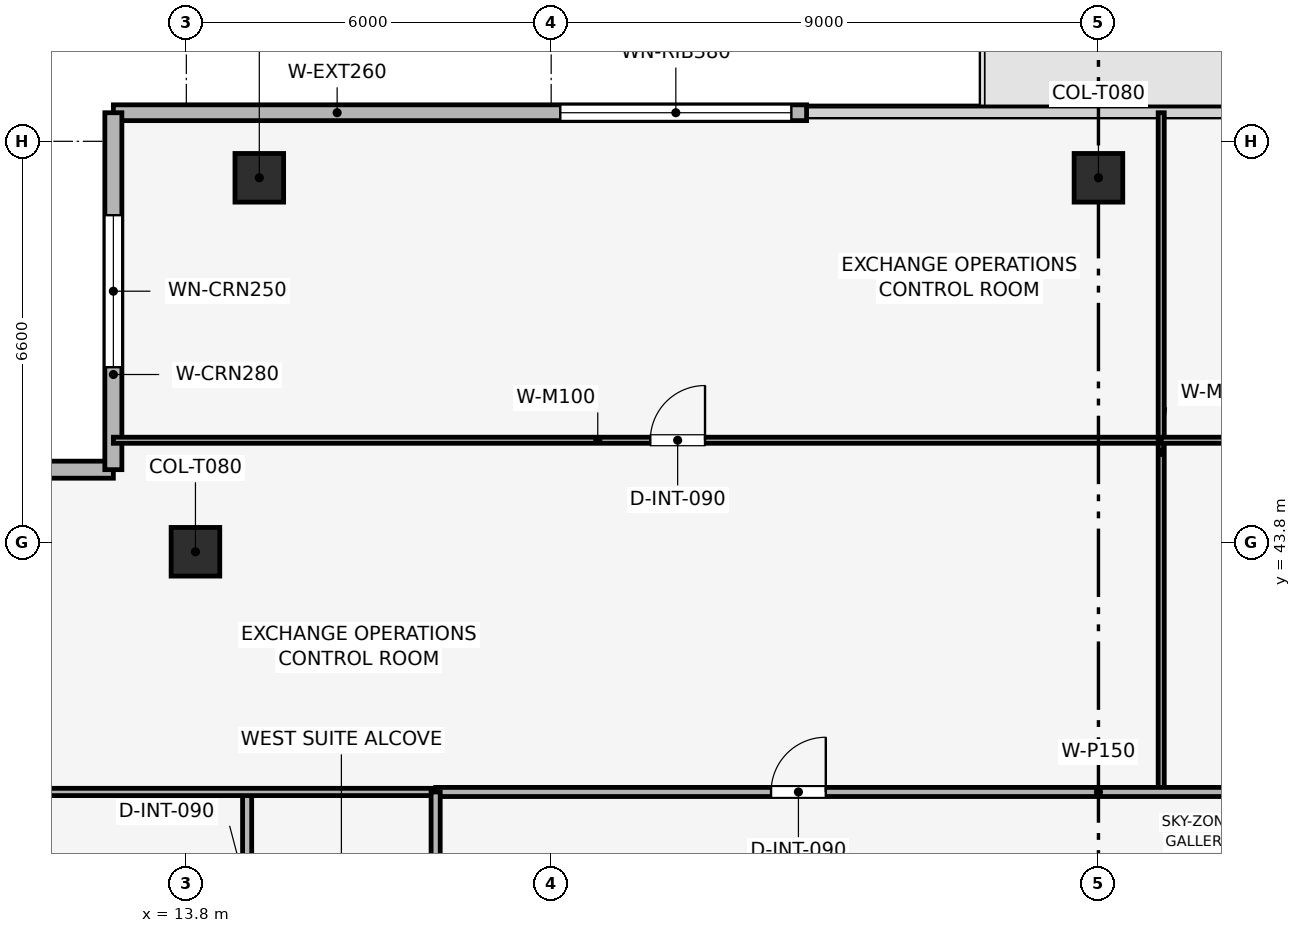
"""IFC4 building model, lengths in metres.
Left out: names, types, materials, properties, quantities, classifications, styles, units other than length and angle.
Written with IfcOpenShell. Run it as: python <this file> out.ifc"""

import sys

from ifc_helpers import new_model, si_unit, direction, frame, frame_2d, origin, origin_2d, place, context, subcontext, project, spatial, rectangle, extrude, element, fill, save


model = new_model("IFC4")
c1 = context("Model", 3, precision=1e-05, world=origin(), true_north=direction((0.0, 1.0)))
c2 = subcontext(c1, "Body", "Model", "MODEL_VIEW")
j1 = project(units=[si_unit("LENGTHUNIT", "METRE"), si_unit("PLANEANGLEUNIT", "RADIAN")], contexts=[c1])
p1 = place(None, origin())
s1 = spatial("IfcSite", under=j1, at=p1, CompositionType="ELEMENT")
p2 = place(p1, origin())
s2 = spatial("IfcBuilding", under=s1, at=p2, CompositionType="ELEMENT")
p3 = place(p2, frame((0.0, 0.0, 336.75)))
s3 = spatial("IfcBuildingStorey", under=s2, at=p3, CompositionType="ELEMENT", Elevation=336.75)
for number, where, z_axis, x_axis in (
    (1, (28.8, 49.8, 0.003), (0.0, 0.0, 1.0), (1.0, 0.0, 0.0)),
    (2, (15.0, 49.8, 0.003), (0.0, 0.0, 1.0), (1.0, 0.0, 0.0)),
    (3, (13.95, 43.65, 0.003), (0.0, 0.0, 1.0), (1.0, 0.0, 0.0)),
):
    element("IfcColumn", number, at=place(p3, frame(where, z_axis=z_axis, x_axis=x_axis)), inside=s3, PredefinedType="COLUMN", context=c2, shape_type="SweptSolid", body=[
        extrude(rectangle(XDim=0.8, YDim=0.8, at=origin_2d()), origin(), (0.0, 0.0, 1.0), 3.504),
    ])
p4 = place(p3, frame((12.6, 50.87, 0.0), z_axis=(0.0, 0.0, 1.0), x_axis=(1.0, 0.0, 0.0)))
e4 = element("IfcWall", 4, at=p4, inside=s3, PredefinedType="SOLIDWALL", context=c2, shape_type="SweptSolid", body=[
    extrude(rectangle(XDim=11.4, YDim=0.26, at=frame_2d((5.7, 0.0))), origin(), (0.0, 0.0, 1.0), 3.51),
])
p5 = place(p4, frame((7.35, 0.0, 0.9)))
e5 = element("IfcOpeningElement", 5, at=p5, cuts=e4, PredefinedType="OPENING", context=c2, shape_type="SweptSolid", body=[
    extrude(rectangle(XDim=3.8, YDim=1.9, at=frame_2d((1.9, 0.95))), frame((0.0, 0.14, 0.0), z_axis=(0.0, -1.0, 0.0), x_axis=(1.0, 0.0, 0.0)), (0.0, 0.0, 1.0), 0.28),
])
p6 = place(p3, frame((6.73, 45.0, 0.0), z_axis=(0.0, 0.0, 1.0), x_axis=(1.0, 0.0, 0.0)))
e6 = element("IfcWall", 6, at=p6, inside=s3, PredefinedType="SOLIDWALL", context=c2, shape_type="SweptSolid", body=[
    extrude(rectangle(XDim=5.87, YDim=0.28, at=frame_2d((2.935, 0.0))), origin(), (0.0, 0.0, 1.0), 3.51),
])
p7 = place(p6, frame((1.685, 0.0, 0.9)))
e7 = element("IfcOpeningElement", 7, at=p7, cuts=e6, PredefinedType="OPENING", context=c2, shape_type="SweptSolid", body=[
    extrude(rectangle(XDim=2.5, YDim=1.9, at=frame_2d((1.25, 0.95))), frame((0.0, 0.15, 0.0), z_axis=(0.0, -1.0, 0.0), x_axis=(1.0, 0.0, 0.0)), (0.0, 0.0, 1.0), 0.3),
])
p8 = place(p3, frame((12.6, 45.0, 0.0), z_axis=(0.0, 0.0, 1.0), x_axis=(0.0, 1.0, 0.0)))
e8 = element("IfcWall", 8, at=p8, inside=s3, PredefinedType="SOLIDWALL", context=c2, shape_type="SweptSolid", body=[
    extrude(rectangle(XDim=5.87, YDim=0.28, at=frame_2d((2.935, 0.0))), origin(), (0.0, 0.0, 1.0), 3.51),
])
p9 = place(p8, frame((1.685, 0.0, 0.9)))
e9 = element("IfcOpeningElement", 9, at=p9, cuts=e8, PredefinedType="OPENING", context=c2, shape_type="SweptSolid", body=[
    extrude(rectangle(XDim=2.5, YDim=1.9, at=frame_2d((1.25, 0.95))), frame((0.0, 0.15, 0.0), z_axis=(0.0, -1.0, 0.0), x_axis=(1.0, 0.0, 0.0)), (0.0, 0.0, 1.0), 0.3),
])
p10 = place(p3, frame((12.6, 45.484, 0.0), z_axis=(0.0, 0.0, 1.0), x_axis=(1.0, 0.0, 0.0)))
e10 = element("IfcWall", 10, at=p10, inside=s3, PredefinedType="MOVABLE", context=c2, shape_type="SweptSolid", body=[
    extrude(rectangle(XDim=17.232, YDim=0.1, at=frame_2d((8.616, 0.0))), origin(), (0.0, 0.0, 1.0), 3.095),
])
p11 = place(p10, frame((8.83, 0.0, 0.0)))
e11 = element("IfcOpeningElement", 11, at=p11, cuts=e10, PredefinedType="OPENING", context=c2, shape_type="SweptSolid", body=[
    extrude(rectangle(XDim=0.9, YDim=2.1, at=frame_2d((0.45, 1.05))), frame((0.0, 0.06, 0.0), z_axis=(0.0, -1.0, 0.0), x_axis=(1.0, 0.0, 0.0)), (0.0, 0.0, 1.0), 0.12),
])
p12 = place(p3, frame((29.832, 39.7, 0.0), z_axis=(0.0, 0.0, 1.0), x_axis=(0.0, 1.0, 0.0)))
e12 = element("IfcWall", 12, at=p12, inside=s3, PredefinedType="MOVABLE", context=c2, shape_type="SweptSolid", body=[
    extrude(rectangle(XDim=11.17, YDim=0.1, at=frame_2d((5.585, 0.0))), origin(), (0.0, 0.0, 1.0), 3.135),
])
p13 = place(p3, frame((29.832, 45.484, 0.0), z_axis=(0.0, 0.0, 1.0), x_axis=(1.0, 0.0, 0.0)))
e13 = element("IfcWall", 13, at=p13, inside=s3, PredefinedType="MOVABLE", context=c2, shape_type="SweptSolid", body=[
    extrude(rectangle(XDim=15.168, YDim=0.1, at=frame_2d((7.584, 0.0))), origin(), (0.0, 0.0, 1.0), 3.095),
])
p14 = place(p13, frame((5.401, 0.0, 0.0)))
e14 = element("IfcOpeningElement", 14, at=p14, cuts=e13, PredefinedType="OPENING", context=c2, shape_type="SweptSolid", body=[
    extrude(rectangle(XDim=0.9, YDim=2.1, at=frame_2d((0.45, 1.05))), frame((0.0, 0.06, 0.0), z_axis=(0.0, -1.0, 0.0), x_axis=(1.0, 0.0, 0.0)), (0.0, 0.0, 1.0), 0.12),
])
p15 = place(p3, frame((14.8, 28.0, 0.0), z_axis=(0.0, 0.0, 1.0), x_axis=(0.0, 1.0, 0.0)))
e15 = element("IfcWall", 15, at=p15, inside=s3, PredefinedType="PARTITIONING", context=c2, shape_type="SweptSolid", body=[
    extrude(rectangle(XDim=11.7, YDim=0.15, at=frame_2d((5.85, 0.0))), origin(), (0.0, 0.0, 1.0), 3.095),
])
p16 = place(p15, frame((9.6, 0.0, 0.0)))
e16 = element("IfcOpeningElement", 16, at=p16, cuts=e15, PredefinedType="OPENING", context=c2, shape_type="SweptSolid", body=[
    extrude(rectangle(XDim=0.9, YDim=2.1, at=frame_2d((0.45, 1.05))), frame((0.0, 0.085, 0.0), z_axis=(0.0, -1.0, 0.0), x_axis=(1.0, 0.0, 0.0)), (0.0, 0.0, 1.0), 0.17),
])
p17 = place(p3, frame((6.73, 39.7, 0.0), z_axis=(0.0, 0.0, 1.0), x_axis=(1.0, 0.0, 0.0)))
e17 = element("IfcWall", 17, at=p17, inside=s3, PredefinedType="PARTITIONING", context=c2, shape_type="SweptSolid", body=[
    extrude(rectangle(XDim=11.17, YDim=0.12, at=frame_2d((5.585, 0.0))), origin(), (0.0, 0.0, 1.0), 3.095),
])
p18 = place(p3, frame((17.9, 39.7, 0.0), z_axis=(0.0, 0.0, 1.0), x_axis=(1.0, 0.0, 0.0)))
e18 = element("IfcWall", 18, at=p18, inside=s3, PredefinedType="PARTITIONING", context=c2, shape_type="SweptSolid", body=[
    extrude(rectangle(XDim=21.8, YDim=0.15, at=frame_2d((10.9, 0.0))), origin(), (0.0, 0.0, 1.0), 3.095),
])
p19 = place(p18, frame((5.516, 0.0, 0.0)))
e19 = element("IfcOpeningElement", 19, at=p19, cuts=e18, PredefinedType="OPENING", context=c2, shape_type="SweptSolid", body=[
    extrude(rectangle(XDim=0.9, YDim=2.1, at=frame_2d((0.45, 1.05))), frame((0.0, 0.085, 0.0), z_axis=(0.0, -1.0, 0.0), x_axis=(1.0, 0.0, 0.0)), (0.0, 0.0, 1.0), 0.17),
])
p20 = place(p18, frame((16.416, 0.0, 0.0)))
e20 = element("IfcOpeningElement", 20, at=p20, cuts=e18, PredefinedType="OPENING", context=c2, shape_type="SweptSolid", body=[
    extrude(rectangle(XDim=0.9, YDim=2.1, at=frame_2d((0.45, 1.05))), frame((0.0, 0.085, 0.0), z_axis=(0.0, -1.0, 0.0), x_axis=(1.0, 0.0, 0.0)), (0.0, 0.0, 1.0), 0.17),
])
p21 = place(p3, frame((17.9, 12.6, 0.0), z_axis=(0.0, 0.0, 1.0), x_axis=(0.0, 1.0, 0.0)))
e21 = element("IfcWall", 21, at=p21, inside=s3, PredefinedType="PARTITIONING", context=c2, shape_type="SweptSolid", body=[
    extrude(rectangle(XDim=27.1, YDim=0.15, at=frame_2d((13.55, 0.0))), origin(), (0.0, 0.0, 1.0), 3.095),
])
p22 = place(p21, frame((7.25, 0.0, 0.0)))
e22 = element("IfcOpeningElement", 22, at=p22, cuts=e21, PredefinedType="OPENING", context=c2, shape_type="SweptSolid", body=[
    extrude(rectangle(XDim=0.9, YDim=2.1, at=frame_2d((0.45, 1.05))), frame((0.0, 0.085, 0.0), z_axis=(0.0, -1.0, 0.0), x_axis=(1.0, 0.0, 0.0)), (0.0, 0.0, 1.0), 0.17),
])
p23 = place(p21, frame((16.35, 0.0, 0.0)))
e23 = element("IfcOpeningElement", 23, at=p23, cuts=e21, PredefinedType="OPENING", context=c2, shape_type="SweptSolid", body=[
    extrude(rectangle(XDim=0.9, YDim=2.1, at=frame_2d((0.45, 1.05))), frame((0.0, 0.085, 0.0), z_axis=(0.0, -1.0, 0.0), x_axis=(1.0, 0.0, 0.0)), (0.0, 0.0, 1.0), 0.17),
])
p24 = place(p21, frame((19.25, 0.0, 0.0)))
e24 = element("IfcOpeningElement", 24, at=p24, cuts=e21, PredefinedType="OPENING", context=c2, shape_type="SweptSolid", body=[
    extrude(rectangle(XDim=0.9, YDim=2.1, at=frame_2d((0.45, 1.05))), frame((0.0, 0.085, 0.0), z_axis=(0.0, -1.0, 0.0), x_axis=(1.0, 0.0, 0.0)), (0.0, 0.0, 1.0), 0.17),
])
p25 = place(p21, frame((22.0, 0.0, 0.0)))
e25 = element("IfcOpeningElement", 25, at=p25, cuts=e21, PredefinedType="OPENING", context=c2, shape_type="SweptSolid", body=[
    extrude(rectangle(XDim=0.95, YDim=2.1, at=frame_2d((0.475, 1.05))), frame((0.0, 0.085, 0.0), z_axis=(0.0, -1.0, 0.0), x_axis=(1.0, 0.0, 0.0)), (0.0, 0.0, 1.0), 0.17),
])
p26 = place(p21, frame((25.0, 0.0, 0.0)))
e26 = element("IfcOpeningElement", 26, at=p26, cuts=e21, PredefinedType="OPENING", context=c2, shape_type="SweptSolid", body=[
    extrude(rectangle(XDim=0.9, YDim=2.1, at=frame_2d((0.45, 1.05))), frame((0.0, 0.085, 0.0), z_axis=(0.0, -1.0, 0.0), x_axis=(1.0, 0.0, 0.0)), (0.0, 0.0, 1.0), 0.17),
])
p27 = place(p5, origin())
e27 = element("IfcWindow", 27, at=p27, inside=s3, PartitioningType="SINGLE_PANEL", PredefinedType="WINDOW", context=c2, shape_type="SweptSolid", body=[
    extrude(rectangle(XDim=3.8, YDim=1.9, at=frame_2d((1.9, 0.95))), frame((0.0, 0.03, 0.0), z_axis=(0.0, -1.0, 0.0), x_axis=(1.0, 0.0, 0.0)), (0.0, 0.0, 1.0), 0.06),
])
fill(e5, e27)
p28 = place(p9, origin())
e28 = element("IfcWindow", 28, at=p28, inside=s3, PartitioningType="SINGLE_PANEL", PredefinedType="WINDOW", context=c2, shape_type="SweptSolid", body=[
    extrude(rectangle(XDim=2.5, YDim=1.9, at=frame_2d((1.25, 0.95))), frame((0.0, 0.03, 0.0), z_axis=(0.0, -1.0, 0.0), x_axis=(1.0, 0.0, 0.0)), (0.0, 0.0, 1.0), 0.06),
])
fill(e9, e28)
p29 = place(p11, origin())
e29 = element("IfcDoor", 29, at=p29, inside=s3, OperationType="SINGLE_SWING_RIGHT", PredefinedType="DOOR", context=c2, shape_type="SweptSolid", body=[
    extrude(rectangle(XDim=0.9, YDim=2.1, at=frame_2d((0.45, 1.05))), frame((0.0, 0.025, 0.0), z_axis=(0.0, -1.0, 0.0), x_axis=(1.0, 0.0, 0.0)), (0.0, 0.0, 1.0), 0.05),
])
fill(e11, e29)
p30 = place(p19, origin())
e30 = element("IfcDoor", 30, at=p30, inside=s3, OperationType="SINGLE_SWING_RIGHT", PredefinedType="DOOR", context=c2, shape_type="SweptSolid", body=[
    extrude(rectangle(XDim=0.9, YDim=2.1, at=frame_2d((0.45, 1.05))), frame((0.0, 0.025, 0.0), z_axis=(0.0, -1.0, 0.0), x_axis=(1.0, 0.0, 0.0)), (0.0, 0.0, 1.0), 0.05),
])
fill(e19, e30)
save(model, sys.argv[1])
